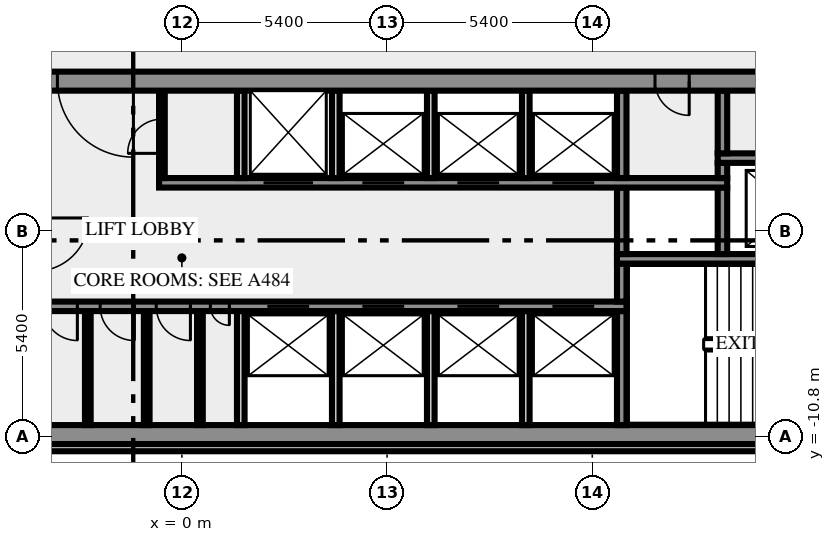
"""IFC4 building model, lengths in metres.
Left out: names, types, materials, properties, quantities, classifications, styles, units other than length and angle.
Written with IfcOpenShell. Run it as: python <this file> out.ifc"""

import sys

from ifc_helpers import new_model, si_unit, direction, frame, frame_2d, origin, place, context, subcontext, project, spatial, rectangle, extrude, element, fill, save


model = new_model("IFC4")
c1 = context("Model", 3, precision=1e-05, world=origin(), true_north=direction((0.0, 1.0)))
c2 = subcontext(c1, "Body", "Model", "MODEL_VIEW")
j1 = project(units=[si_unit("LENGTHUNIT", "METRE"), si_unit("PLANEANGLEUNIT", "RADIAN")], contexts=[c1])
p1 = place(None, origin())
s1 = spatial("IfcSite", under=j1, at=p1, CompositionType="ELEMENT")
p2 = place(p1, origin())
s2 = spatial("IfcBuilding", under=s1, at=p2, CompositionType="ELEMENT")
p3 = place(p2, frame((0.0, 0.0, 168.0)))
s3 = spatial("IfcBuildingStorey", under=s2, at=p3, CompositionType="ELEMENT", Elevation=168.0)
p4 = place(p3, frame((-17.444, -11.088, 0.0), z_axis=(0.0, 0.0, 1.0), x_axis=(1.0, 0.0, 0.0)))
e1 = element("IfcWall", 1, at=p4, inside=s3, PredefinedType="SOLIDWALL", context=c2, shape_type="SweptSolid", body=[
    extrude(rectangle(XDim=34.888, YDim=0.2, at=frame_2d((17.444, 0.0))), origin(), (0.0, 0.0, 1.0), 3.65),
])
p5 = place(p3, frame((-20.0, -10.75, 0.0), z_axis=(0.0, 0.0, 1.0), x_axis=(1.0, 0.0, 0.0)))
e2 = element("IfcWall", 2, at=p5, inside=s3, PredefinedType="SHEAR", context=c2, shape_type="SweptSolid", body=[
    extrude(rectangle(XDim=40.0, YDim=0.5, at=frame_2d((20.0, 0.0))), origin(), (0.0, 0.0, 1.0), 3.65),
])
p6 = place(p5, frame((0.8, 0.0, 1.0)))
e3 = element("IfcOpeningElement", 3, at=p6, cuts=e2, PredefinedType="OPENING", context=c2, shape_type="SweptSolid", body=[
    extrude(rectangle(XDim=1.2, YDim=1.2, at=frame_2d((0.6, 0.6))), frame((0.0, 0.26, 0.0), z_axis=(0.0, -1.0, 0.0), x_axis=(1.0, 0.0, 0.0)), (0.0, 0.0, 1.0), 0.52),
])
p7 = place(p5, frame((38.0, 0.0, 1.0)))
e4 = element("IfcOpeningElement", 4, at=p7, cuts=e2, PredefinedType="OPENING", context=c2, shape_type="SweptSolid", body=[
    extrude(rectangle(XDim=1.2, YDim=1.2, at=frame_2d((0.6, 0.6))), frame((0.0, 0.26, 0.0), z_axis=(0.0, -1.0, 0.0), x_axis=(1.0, 0.0, 0.0)), (0.0, 0.0, 1.0), 0.52),
])
for number, where, z_axis, x_axis in (
    (5, (-2.475, -10.5, 0.0), (0.0, 0.0, 1.0), (0.0, 1.0, 0.0)),
    (6, (-0.925, -10.5, 0.0), (0.0, 0.0, 1.0), (0.0, 1.0, 0.0)),
    (7, (0.475, -10.5, 0.0), (0.0, 0.0, 1.0), (0.0, 1.0, 0.0)),
):
    element("IfcWall", number, at=place(p3, frame(where, z_axis=z_axis, x_axis=x_axis)), inside=s3, PredefinedType="PARTITIONING", context=c2, shape_type="SweptSolid", body=[
        extrude(rectangle(XDim=3.0, YDim=0.15, at=frame_2d((1.5, 0.0))), origin(), (0.0, 0.0, 1.0), 3.65),
    ])
for number, where, z_axis, x_axis in (
    (8, (1.55, -10.5, 0.0), (0.0, 0.0, 1.0), (0.0, 1.0, 0.0)),
    (9, (4.05, -10.5, 0.0), (0.0, 0.0, 1.0), (0.0, 1.0, 0.0)),
    (10, (6.55, -10.5, 0.0), (0.0, 0.0, 1.0), (0.0, 1.0, 0.0)),
    (11, (9.05, -10.5, 0.0), (0.0, 0.0, 1.0), (0.0, 1.0, 0.0)),
):
    element("IfcWall", number, at=place(p3, frame(where, z_axis=z_axis, x_axis=x_axis)), inside=s3, PredefinedType="SOLIDWALL", context=c2, shape_type="SweptSolid", body=[
        extrude(rectangle(XDim=3.0, YDim=0.2, at=frame_2d((1.5, 0.0))), origin(), (0.0, 0.0, 1.0), 3.65),
    ])
p8 = place(p3, frame((11.575, -10.5, 0.0), z_axis=(0.0, 0.0, 1.0), x_axis=(0.0, 1.0, 0.0)))
e12 = element("IfcWall", 12, at=p8, inside=s3, PredefinedType="SHEAR", context=c2, shape_type="SweptSolid", body=[
    extrude(rectangle(XDim=3.0, YDim=0.25, at=frame_2d((1.5, 0.0))), origin(), (0.0, 0.0, 1.0), 3.65),
])
p9 = place(p3, frame((11.7, -7.375, 0.0), z_axis=(0.0, 0.0, 1.0), x_axis=(-1.0, 0.0, 0.0)))
e13 = element("IfcWall", 13, at=p9, inside=s3, PredefinedType="SHEAR", context=c2, shape_type="SweptSolid", body=[
    extrude(rectangle(XDim=23.4, YDim=0.25, at=frame_2d((11.7, 0.0))), origin(), (0.0, 0.0, 1.0), 3.65),
])
p10 = place(p9, frame((20.213, 0.0, 0.0)))
e14 = element("IfcOpeningElement", 14, at=p10, cuts=e13, PredefinedType="OPENING", context=c2, shape_type="SweptSolid", body=[
    extrude(rectangle(XDim=0.9, YDim=2.1, at=frame_2d((0.45, 1.05))), frame((0.0, 0.135, 0.0), z_axis=(0.0, -1.0, 0.0), x_axis=(1.0, 0.0, 0.0)), (0.0, 0.0, 1.0), 0.27),
])
p11 = place(p9, frame((16.488, 0.0, 0.0)))
e15 = element("IfcOpeningElement", 15, at=p11, cuts=e13, PredefinedType="OPENING", context=c2, shape_type="SweptSolid", body=[
    extrude(rectangle(XDim=0.9, YDim=2.1, at=frame_2d((0.45, 1.05))), frame((0.0, 0.135, 0.0), z_axis=(0.0, -1.0, 0.0), x_axis=(1.0, 0.0, 0.0)), (0.0, 0.0, 1.0), 0.27),
])
p12 = place(p9, frame((14.45, 0.0, 0.0)))
e16 = element("IfcOpeningElement", 16, at=p12, cuts=e13, PredefinedType="OPENING", context=c2, shape_type="SweptSolid", body=[
    extrude(rectangle(XDim=0.9, YDim=2.1, at=frame_2d((0.45, 1.05))), frame((0.0, 0.135, 0.0), z_axis=(0.0, -1.0, 0.0), x_axis=(1.0, 0.0, 0.0)), (0.0, 0.0, 1.0), 0.27),
])
p13 = place(p9, frame((12.95, 0.0, 0.0)))
e17 = element("IfcOpeningElement", 17, at=p13, cuts=e13, PredefinedType="OPENING", context=c2, shape_type="SweptSolid", body=[
    extrude(rectangle(XDim=0.9, YDim=2.1, at=frame_2d((0.45, 1.05))), frame((0.0, 0.135, 0.0), z_axis=(0.0, -1.0, 0.0), x_axis=(1.0, 0.0, 0.0)), (0.0, 0.0, 1.0), 0.27),
])
p14 = place(p9, frame((11.475, 0.0, 0.0)))
e18 = element("IfcOpeningElement", 18, at=p14, cuts=e13, PredefinedType="OPENING", context=c2, shape_type="SweptSolid", body=[
    extrude(rectangle(XDim=0.9, YDim=2.1, at=frame_2d((0.45, 1.05))), frame((0.0, 0.135, 0.0), z_axis=(0.0, -1.0, 0.0), x_axis=(1.0, 0.0, 0.0)), (0.0, 0.0, 1.0), 0.27),
])
p15 = place(p9, frame((10.45, 0.0, 0.0)))
e19 = element("IfcOpeningElement", 19, at=p15, cuts=e13, PredefinedType="OPENING", context=c2, shape_type="SweptSolid", body=[
    extrude(rectangle(XDim=0.5, YDim=2.1, at=frame_2d((0.25, 1.05))), frame((0.0, 0.135, 0.0), z_axis=(0.0, -1.0, 0.0), x_axis=(1.0, 0.0, 0.0)), (0.0, 0.0, 1.0), 0.27),
])
p16 = place(p9, frame((8.35, 0.0, 0.0)))
e20 = element("IfcOpeningElement", 20, at=p16, cuts=e13, PredefinedType="OPENING", context=c2, shape_type="SweptSolid", body=[
    extrude(rectangle(XDim=1.1, YDim=2.1, at=frame_2d((0.55, 1.05))), frame((0.0, 0.135, 0.0), z_axis=(0.0, -1.0, 0.0), x_axis=(1.0, 0.0, 0.0)), (0.0, 0.0, 1.0), 0.27),
])
p17 = place(p9, frame((5.85, 0.0, 0.0)))
e21 = element("IfcOpeningElement", 21, at=p17, cuts=e13, PredefinedType="OPENING", context=c2, shape_type="SweptSolid", body=[
    extrude(rectangle(XDim=1.1, YDim=2.1, at=frame_2d((0.55, 1.05))), frame((0.0, 0.135, 0.0), z_axis=(0.0, -1.0, 0.0), x_axis=(1.0, 0.0, 0.0)), (0.0, 0.0, 1.0), 0.27),
])
p18 = place(p9, frame((3.35, 0.0, 0.0)))
e22 = element("IfcOpeningElement", 22, at=p18, cuts=e13, PredefinedType="OPENING", context=c2, shape_type="SweptSolid", body=[
    extrude(rectangle(XDim=1.1, YDim=2.1, at=frame_2d((0.55, 1.05))), frame((0.0, 0.135, 0.0), z_axis=(0.0, -1.0, 0.0), x_axis=(1.0, 0.0, 0.0)), (0.0, 0.0, 1.0), 0.27),
])
p19 = place(p9, frame((0.85, 0.0, 0.0)))
e23 = element("IfcOpeningElement", 23, at=p19, cuts=e13, PredefinedType="OPENING", context=c2, shape_type="SweptSolid", body=[
    extrude(rectangle(XDim=1.1, YDim=2.1, at=frame_2d((0.55, 1.05))), frame((0.0, 0.135, 0.0), z_axis=(0.0, -1.0, 0.0), x_axis=(1.0, 0.0, 0.0)), (0.0, 0.0, 1.0), 0.27),
])
p20 = place(p3, frame((11.575, -7.25, 0.0), z_axis=(0.0, 0.0, 1.0), x_axis=(0.0, 1.0, 0.0)))
e24 = element("IfcWall", 24, at=p20, inside=s3, PredefinedType="SHEAR", context=c2, shape_type="SweptSolid", body=[
    extrude(rectangle(XDim=1.0, YDim=0.25, at=frame_2d((0.5, 0.0))), origin(), (0.0, 0.0, 1.0), 3.65),
])
p21 = place(p3, frame((19.5, -6.125, 0.0), z_axis=(0.0, 0.0, 1.0), x_axis=(-1.0, 0.0, 0.0)))
e25 = element("IfcWall", 25, at=p21, inside=s3, PredefinedType="SHEAR", context=c2, shape_type="SweptSolid", body=[
    extrude(rectangle(XDim=8.05, YDim=0.25, at=frame_2d((4.025, 0.0))), origin(), (0.0, 0.0, 1.0), 3.65),
])
p22 = place(p21, frame((0.05, 0.0, 0.0)))
e26 = element("IfcOpeningElement", 26, at=p22, cuts=e25, PredefinedType="OPENING", context=c2, shape_type="SweptSolid", body=[
    extrude(rectangle(XDim=1.8, YDim=2.1, at=frame_2d((0.9, 1.05))), frame((0.0, 0.135, 0.0), z_axis=(0.0, -1.0, 0.0), x_axis=(1.0, 0.0, 0.0)), (0.0, 0.0, 1.0), 0.27),
])
for number, where, z_axis, x_axis in (
    (27, (11.575, -6.0, 0.0), (0.0, 0.0, 1.0), (0.0, 1.0, 0.0)),
    (28, (14.225, -6.0, 0.0), (0.0, 0.0, 1.0), (0.0, 1.0, 0.0)),
):
    element("IfcWall", number, at=place(p3, frame(where, z_axis=z_axis, x_axis=x_axis)), inside=s3, PredefinedType="SHEAR", context=c2, shape_type="SweptSolid", body=[
        extrude(rectangle(XDim=1.75, YDim=0.25, at=frame_2d((0.875, 0.0))), origin(), (0.0, 0.0, 1.0), 3.65),
    ])
p23 = place(p3, frame((-0.6, -4.125, 0.0), z_axis=(0.0, 0.0, 1.0), x_axis=(1.0, 0.0, 0.0)))
e29 = element("IfcWall", 29, at=p23, inside=s3, PredefinedType="SHEAR", context=c2, shape_type="SweptSolid", body=[
    extrude(rectangle(XDim=14.95, YDim=0.25, at=frame_2d((7.475, 0.0))), origin(), (0.0, 0.0, 1.0), 3.65),
])
p24 = place(p23, frame((2.75, 0.0, 0.0)))
e30 = element("IfcOpeningElement", 30, at=p24, cuts=e29, PredefinedType="OPENING", context=c2, shape_type="SweptSolid", body=[
    extrude(rectangle(XDim=1.3, YDim=2.1, at=frame_2d((0.65, 1.05))), frame((0.0, 0.135, 0.0), z_axis=(0.0, -1.0, 0.0), x_axis=(1.0, 0.0, 0.0)), (0.0, 0.0, 1.0), 0.27),
])
p25 = place(p23, frame((5.35, 0.0, 0.0)))
e31 = element("IfcOpeningElement", 31, at=p25, cuts=e29, PredefinedType="OPENING", context=c2, shape_type="SweptSolid", body=[
    extrude(rectangle(XDim=1.1, YDim=2.1, at=frame_2d((0.55, 1.05))), frame((0.0, 0.135, 0.0), z_axis=(0.0, -1.0, 0.0), x_axis=(1.0, 0.0, 0.0)), (0.0, 0.0, 1.0), 0.27),
])
p26 = place(p23, frame((7.85, 0.0, 0.0)))
e32 = element("IfcOpeningElement", 32, at=p26, cuts=e29, PredefinedType="OPENING", context=c2, shape_type="SweptSolid", body=[
    extrude(rectangle(XDim=1.1, YDim=2.1, at=frame_2d((0.55, 1.05))), frame((0.0, 0.135, 0.0), z_axis=(0.0, -1.0, 0.0), x_axis=(1.0, 0.0, 0.0)), (0.0, 0.0, 1.0), 0.27),
])
p27 = place(p23, frame((10.35, 0.0, 0.0)))
e33 = element("IfcOpeningElement", 33, at=p27, cuts=e29, PredefinedType="OPENING", context=c2, shape_type="SweptSolid", body=[
    extrude(rectangle(XDim=1.1, YDim=2.1, at=frame_2d((0.55, 1.05))), frame((0.0, 0.135, 0.0), z_axis=(0.0, -1.0, 0.0), x_axis=(1.0, 0.0, 0.0)), (0.0, 0.0, 1.0), 0.27),
])
p28 = place(p3, frame((-0.525, -4.0, 0.0), z_axis=(0.0, 0.0, 1.0), x_axis=(0.0, 1.0, 0.0)))
e34 = element("IfcWall", 34, at=p28, inside=s3, PredefinedType="PARTITIONING", context=c2, shape_type="SweptSolid", body=[
    extrude(rectangle(XDim=2.3, YDim=0.15, at=frame_2d((1.15, 0.0))), origin(), (0.0, 0.0, 1.0), 3.65),
])
p29 = place(p28, frame((0.65, 0.0, 0.0)))
e35 = element("IfcOpeningElement", 35, at=p29, cuts=e34, PredefinedType="OPENING", context=c2, shape_type="SweptSolid", body=[
    extrude(rectangle(XDim=0.9, YDim=2.1, at=frame_2d((0.45, 1.05))), frame((0.0, 0.085, 0.0), z_axis=(0.0, -1.0, 0.0), x_axis=(1.0, 0.0, 0.0)), (0.0, 0.0, 1.0), 0.17),
])
for number, where, z_axis, x_axis in (
    (36, (1.55, -4.0, 0.0), (0.0, 0.0, 1.0), (0.0, 1.0, 0.0)),
    (37, (4.05, -4.0, 0.0), (0.0, 0.0, 1.0), (0.0, 1.0, 0.0)),
    (38, (6.55, -4.0, 0.0), (0.0, 0.0, 1.0), (0.0, 1.0, 0.0)),
    (39, (9.05, -4.0, 0.0), (0.0, 0.0, 1.0), (0.0, 1.0, 0.0)),
):
    element("IfcWall", number, at=place(p3, frame(where, z_axis=z_axis, x_axis=x_axis)), inside=s3, PredefinedType="SOLIDWALL", context=c2, shape_type="SweptSolid", body=[
        extrude(rectangle(XDim=2.3, YDim=0.2, at=frame_2d((1.15, 0.0))), origin(), (0.0, 0.0, 1.0), 3.65),
    ])
p30 = place(p3, frame((11.575, -4.0, 0.0), z_axis=(0.0, 0.0, 1.0), x_axis=(0.0, 1.0, 0.0)))
e40 = element("IfcWall", 40, at=p30, inside=s3, PredefinedType="SHEAR", context=c2, shape_type="SweptSolid", body=[
    extrude(rectangle(XDim=2.3, YDim=0.25, at=frame_2d((1.15, 0.0))), origin(), (0.0, 0.0, 1.0), 3.65),
])
p31 = place(p3, frame((14.225, -4.0, 0.0), z_axis=(0.0, 0.0, 1.0), x_axis=(0.0, 1.0, 0.0)))
e41 = element("IfcWall", 41, at=p31, inside=s3, PredefinedType="SHEAR", context=c2, shape_type="SweptSolid", body=[
    extrude(rectangle(XDim=0.4, YDim=0.25, at=frame_2d((0.2, 0.0))), origin(), (0.0, 0.0, 1.0), 3.65),
])
p32 = place(p3, frame((14.1, -3.475, 0.0), z_axis=(0.0, 0.0, 1.0), x_axis=(1.0, 0.0, 0.0)))
e42 = element("IfcWall", 42, at=p32, inside=s3, PredefinedType="SHEAR", context=c2, shape_type="SweptSolid", body=[
    extrude(rectangle(XDim=3.25, YDim=0.25, at=frame_2d((1.625, 0.0))), origin(), (0.0, 0.0, 1.0), 3.65),
])
p33 = place(p3, frame((14.225, -3.35, 0.0), z_axis=(0.0, 0.0, 1.0), x_axis=(0.0, 1.0, 0.0)))
e43 = element("IfcWall", 43, at=p33, inside=s3, PredefinedType="SHEAR", context=c2, shape_type="SweptSolid", body=[
    extrude(rectangle(XDim=1.65, YDim=0.25, at=frame_2d((0.825, 0.0))), origin(), (0.0, 0.0, 1.0), 3.65),
])
p34 = place(p3, frame((20.49, -1.45, 0.0), z_axis=(0.0, 0.0, 1.0), x_axis=(-1.0, 0.0, 0.0)))
e44 = element("IfcWall", 44, at=p34, inside=s3, PredefinedType="SHEAR", context=c2, shape_type="SweptSolid", body=[
    extrude(rectangle(XDim=40.98, YDim=0.5, at=frame_2d((20.49, 0.0))), origin(), (0.0, 0.0, 1.0), 3.65),
])
p35 = place(p34, frame((38.14, 0.0, 0.0)))
e45 = element("IfcOpeningElement", 45, at=p35, cuts=e44, PredefinedType="OPENING", context=c2, shape_type="SweptSolid", body=[
    extrude(rectangle(XDim=1.8, YDim=2.1, at=frame_2d((0.9, 1.05))), frame((0.0, 0.26, 0.0), z_axis=(0.0, -1.0, 0.0), x_axis=(1.0, 0.0, 0.0)), (0.0, 0.0, 1.0), 0.52),
])
p36 = place(p34, frame((36.728, 0.0, 0.0)))
e46 = element("IfcOpeningElement", 46, at=p36, cuts=e44, PredefinedType="OPENING", context=c2, shape_type="SweptSolid", body=[
    extrude(rectangle(XDim=0.8, YDim=2.1, at=frame_2d((0.4, 1.05))), frame((0.0, 0.26, 0.0), z_axis=(0.0, -1.0, 0.0), x_axis=(1.0, 0.0, 0.0)), (0.0, 0.0, 1.0), 0.52),
])
p37 = place(p34, frame((35.153, 0.0, 0.0)))
e47 = element("IfcOpeningElement", 47, at=p37, cuts=e44, PredefinedType="OPENING", context=c2, shape_type="SweptSolid", body=[
    extrude(rectangle(XDim=0.8, YDim=2.1, at=frame_2d((0.4, 1.05))), frame((0.0, 0.26, 0.0), z_axis=(0.0, -1.0, 0.0), x_axis=(1.0, 0.0, 0.0)), (0.0, 0.0, 1.0), 0.52),
])
p38 = place(p34, frame((32.94, 0.0, 0.0)))
e48 = element("IfcOpeningElement", 48, at=p38, cuts=e44, PredefinedType="OPENING", context=c2, shape_type="SweptSolid", body=[
    extrude(rectangle(XDim=0.9, YDim=2.1, at=frame_2d((0.45, 1.05))), frame((0.0, 0.26, 0.0), z_axis=(0.0, -1.0, 0.0), x_axis=(1.0, 0.0, 0.0)), (0.0, 0.0, 1.0), 0.52),
])
p39 = place(p34, frame((27.84, 0.0, 0.0)))
e49 = element("IfcOpeningElement", 49, at=p39, cuts=e44, PredefinedType="OPENING", context=c2, shape_type="SweptSolid", body=[
    extrude(rectangle(XDim=0.9, YDim=2.1, at=frame_2d((0.45, 1.05))), frame((0.0, 0.26, 0.0), z_axis=(0.0, -1.0, 0.0), x_axis=(1.0, 0.0, 0.0)), (0.0, 0.0, 1.0), 0.52),
])
p40 = place(p34, frame((21.765, 0.0, 0.0)))
e50 = element("IfcOpeningElement", 50, at=p40, cuts=e44, PredefinedType="OPENING", context=c2, shape_type="SweptSolid", body=[
    extrude(rectangle(XDim=2.0, YDim=2.1, at=frame_2d((1.0, 1.05))), frame((0.0, 0.26, 0.0), z_axis=(0.0, -1.0, 0.0), x_axis=(1.0, 0.0, 0.0)), (0.0, 0.0, 1.0), 0.52),
])
p41 = place(p34, frame((7.14, 0.0, 0.0)))
e51 = element("IfcOpeningElement", 51, at=p41, cuts=e44, PredefinedType="OPENING", context=c2, shape_type="SweptSolid", body=[
    extrude(rectangle(XDim=0.9, YDim=2.1, at=frame_2d((0.45, 1.05))), frame((0.0, 0.26, 0.0), z_axis=(0.0, -1.0, 0.0), x_axis=(1.0, 0.0, 0.0)), (0.0, 0.0, 1.0), 0.52),
])
p42 = place(p34, frame((4.19, 0.0, 0.0)))
e52 = element("IfcOpeningElement", 52, at=p42, cuts=e44, PredefinedType="OPENING", context=c2, shape_type="SweptSolid", body=[
    extrude(rectangle(XDim=0.9, YDim=2.1, at=frame_2d((0.45, 1.05))), frame((0.0, 0.26, 0.0), z_axis=(0.0, -1.0, 0.0), x_axis=(1.0, 0.0, 0.0)), (0.0, 0.0, 1.0), 0.52),
])
p43 = place(p34, frame((1.04, 0.0, 0.0)))
e53 = element("IfcOpeningElement", 53, at=p43, cuts=e44, PredefinedType="OPENING", context=c2, shape_type="SweptSolid", body=[
    extrude(rectangle(XDim=1.8, YDim=2.1, at=frame_2d((0.9, 1.05))), frame((0.0, 0.26, 0.0), z_axis=(0.0, -1.0, 0.0), x_axis=(1.0, 0.0, 0.0)), (0.0, 0.0, 1.0), 0.52),
])
p44 = place(p12, origin())
e54 = element("IfcDoor", 54, at=p44, inside=s3, OperationType="SINGLE_SWING_RIGHT", PredefinedType="DOOR", context=c2, shape_type="SweptSolid", body=[
    extrude(rectangle(XDim=0.9, YDim=2.1, at=frame_2d((0.45, 1.05))), frame((0.0, 0.025, 0.0), z_axis=(0.0, -1.0, 0.0), x_axis=(1.0, 0.0, 0.0)), (0.0, 0.0, 1.0), 0.05),
])
fill(e16, e54)
p45 = place(p13, origin())
e55 = element("IfcDoor", 55, at=p45, inside=s3, OperationType="SINGLE_SWING_RIGHT", PredefinedType="DOOR", context=c2, shape_type="SweptSolid", body=[
    extrude(rectangle(XDim=0.9, YDim=2.1, at=frame_2d((0.45, 1.05))), frame((0.0, 0.025, 0.0), z_axis=(0.0, -1.0, 0.0), x_axis=(1.0, 0.0, 0.0)), (0.0, 0.0, 1.0), 0.05),
])
fill(e17, e55)
p46 = place(p14, origin())
e56 = element("IfcDoor", 56, at=p46, inside=s3, OperationType="SINGLE_SWING_RIGHT", PredefinedType="DOOR", context=c2, shape_type="SweptSolid", body=[
    extrude(rectangle(XDim=0.9, YDim=2.1, at=frame_2d((0.45, 1.05))), frame((0.0, 0.025, 0.0), z_axis=(0.0, -1.0, 0.0), x_axis=(1.0, 0.0, 0.0)), (0.0, 0.0, 1.0), 0.05),
])
fill(e18, e56)
p47 = place(p15, origin())
e57 = element("IfcDoor", 57, at=p47, inside=s3, OperationType="SINGLE_SWING_LEFT", PredefinedType="DOOR", context=c2, shape_type="SweptSolid", body=[
    extrude(rectangle(XDim=0.5, YDim=2.1, at=frame_2d((0.25, 1.05))), frame((0.0, 0.025, 0.0), z_axis=(0.0, -1.0, 0.0), x_axis=(1.0, 0.0, 0.0)), (0.0, 0.0, 1.0), 0.05),
])
fill(e19, e57)
p48 = place(p16, origin())
e58 = element("IfcDoor", 58, at=p48, inside=s3, OperationType="DOUBLE_DOOR_SLIDING", PredefinedType="DOOR", context=c2, shape_type="SweptSolid", body=[
    extrude(rectangle(XDim=1.1, YDim=2.1, at=frame_2d((0.55, 1.05))), frame((0.0, 0.025, 0.0), z_axis=(0.0, -1.0, 0.0), x_axis=(1.0, 0.0, 0.0)), (0.0, 0.0, 1.0), 0.05),
])
fill(e20, e58)
p49 = place(p17, origin())
e59 = element("IfcDoor", 59, at=p49, inside=s3, OperationType="DOUBLE_DOOR_SLIDING", PredefinedType="DOOR", context=c2, shape_type="SweptSolid", body=[
    extrude(rectangle(XDim=1.1, YDim=2.1, at=frame_2d((0.55, 1.05))), frame((0.0, 0.025, 0.0), z_axis=(0.0, -1.0, 0.0), x_axis=(1.0, 0.0, 0.0)), (0.0, 0.0, 1.0), 0.05),
])
fill(e21, e59)
p50 = place(p18, origin())
e60 = element("IfcDoor", 60, at=p50, inside=s3, OperationType="DOUBLE_DOOR_SLIDING", PredefinedType="DOOR", context=c2, shape_type="SweptSolid", body=[
    extrude(rectangle(XDim=1.1, YDim=2.1, at=frame_2d((0.55, 1.05))), frame((0.0, 0.025, 0.0), z_axis=(0.0, -1.0, 0.0), x_axis=(1.0, 0.0, 0.0)), (0.0, 0.0, 1.0), 0.05),
])
fill(e22, e60)
p51 = place(p19, origin())
e61 = element("IfcDoor", 61, at=p51, inside=s3, OperationType="DOUBLE_DOOR_SLIDING", PredefinedType="DOOR", context=c2, shape_type="SweptSolid", body=[
    extrude(rectangle(XDim=1.1, YDim=2.1, at=frame_2d((0.55, 1.05))), frame((0.0, 0.025, 0.0), z_axis=(0.0, -1.0, 0.0), x_axis=(1.0, 0.0, 0.0)), (0.0, 0.0, 1.0), 0.05),
])
fill(e23, e61)
p52 = place(p24, origin())
e62 = element("IfcDoor", 62, at=p52, inside=s3, OperationType="DOUBLE_DOOR_SLIDING", PredefinedType="DOOR", context=c2, shape_type="SweptSolid", body=[
    extrude(rectangle(XDim=1.3, YDim=2.1, at=frame_2d((0.65, 1.05))), frame((0.0, 0.025, 0.0), z_axis=(0.0, -1.0, 0.0), x_axis=(1.0, 0.0, 0.0)), (0.0, 0.0, 1.0), 0.05),
])
fill(e30, e62)
p53 = place(p25, origin())
e63 = element("IfcDoor", 63, at=p53, inside=s3, OperationType="DOUBLE_DOOR_SLIDING", PredefinedType="DOOR", context=c2, shape_type="SweptSolid", body=[
    extrude(rectangle(XDim=1.1, YDim=2.1, at=frame_2d((0.55, 1.05))), frame((0.0, 0.025, 0.0), z_axis=(0.0, -1.0, 0.0), x_axis=(1.0, 0.0, 0.0)), (0.0, 0.0, 1.0), 0.05),
])
fill(e31, e63)
p54 = place(p26, origin())
e64 = element("IfcDoor", 64, at=p54, inside=s3, OperationType="DOUBLE_DOOR_SLIDING", PredefinedType="DOOR", context=c2, shape_type="SweptSolid", body=[
    extrude(rectangle(XDim=1.1, YDim=2.1, at=frame_2d((0.55, 1.05))), frame((0.0, 0.025, 0.0), z_axis=(0.0, -1.0, 0.0), x_axis=(1.0, 0.0, 0.0)), (0.0, 0.0, 1.0), 0.05),
])
fill(e32, e64)
p55 = place(p27, origin())
e65 = element("IfcDoor", 65, at=p55, inside=s3, OperationType="DOUBLE_DOOR_SLIDING", PredefinedType="DOOR", context=c2, shape_type="SweptSolid", body=[
    extrude(rectangle(XDim=1.1, YDim=2.1, at=frame_2d((0.55, 1.05))), frame((0.0, 0.025, 0.0), z_axis=(0.0, -1.0, 0.0), x_axis=(1.0, 0.0, 0.0)), (0.0, 0.0, 1.0), 0.05),
])
fill(e33, e65)
p56 = place(p29, origin())
e66 = element("IfcDoor", 66, at=p56, inside=s3, OperationType="SINGLE_SWING_LEFT", PredefinedType="DOOR", context=c2, shape_type="SweptSolid", body=[
    extrude(rectangle(XDim=0.9, YDim=2.1, at=frame_2d((0.45, 1.05))), frame((0.0, 0.025, 0.0), z_axis=(0.0, -1.0, 0.0), x_axis=(1.0, 0.0, 0.0)), (0.0, 0.0, 1.0), 0.05),
])
fill(e35, e66)
p57 = place(p40, origin())
e67 = element("IfcDoor", 67, at=p57, inside=s3, OperationType="DOUBLE_DOOR_SINGLE_SWING", PredefinedType="DOOR", context=c2, shape_type="SweptSolid", body=[
    extrude(rectangle(XDim=2.0, YDim=2.1, at=frame_2d((1.0, 1.05))), frame((0.0, 0.025, 0.0), z_axis=(0.0, -1.0, 0.0), x_axis=(1.0, 0.0, 0.0)), (0.0, 0.0, 1.0), 0.05),
])
fill(e50, e67)
p58 = place(p41, origin())
e68 = element("IfcDoor", 68, at=p58, inside=s3, OperationType="SINGLE_SWING_LEFT", PredefinedType="DOOR", context=c2, shape_type="SweptSolid", body=[
    extrude(rectangle(XDim=0.9, YDim=2.1, at=frame_2d((0.45, 1.05))), frame((0.0, 0.025, 0.0), z_axis=(0.0, -1.0, 0.0), x_axis=(1.0, 0.0, 0.0)), (0.0, 0.0, 1.0), 0.05),
])
fill(e51, e68)
save(model, sys.argv[1])
